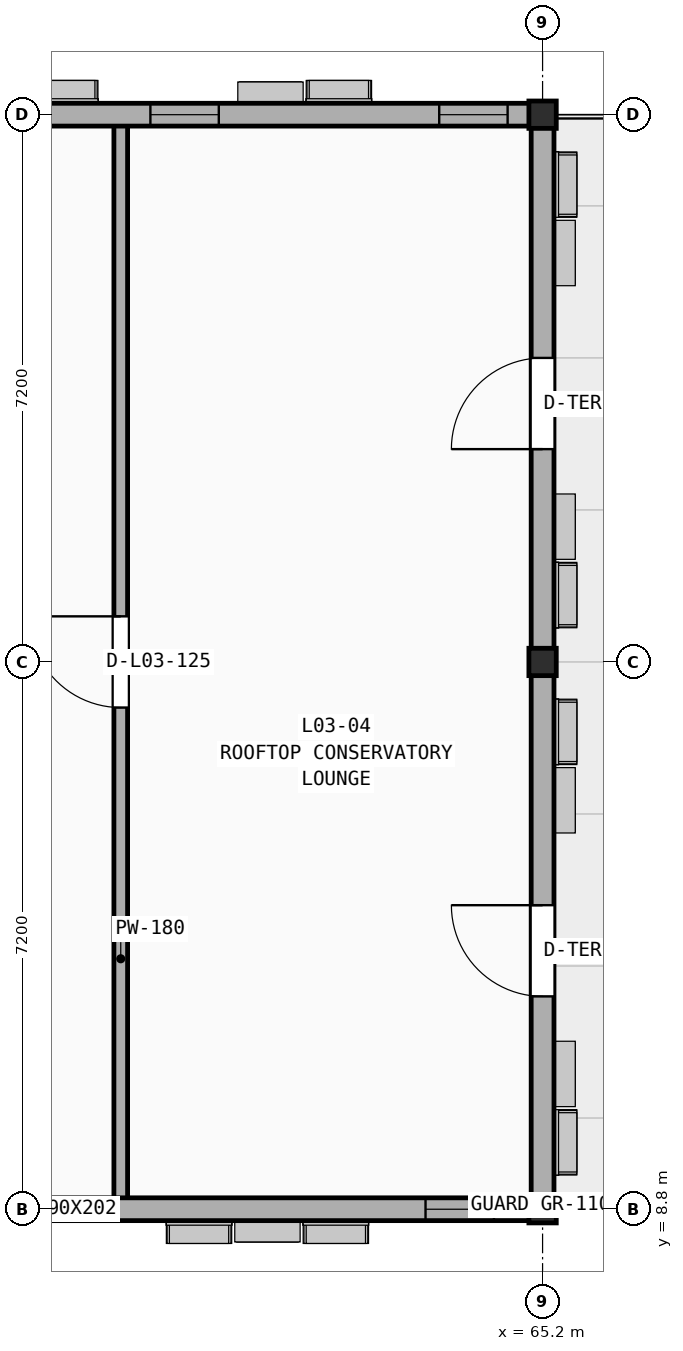
"""IFC4 building model, lengths in metres.
Left out: names, types, materials, properties, quantities, classifications, styles, units other than length and angle.
Written with IfcOpenShell. Run it as: python <this file> out.ifc"""

import sys

from ifc_helpers import new_model, si_unit, direction, frame, frame_2d, origin, origin_2d, place, context, subcontext, project, spatial, rectangle, extrude, element, fill, save


model = new_model("IFC4")
c1 = context("Model", 3, precision=1e-05, world=origin(), true_north=direction((0.0, 1.0)))
c2 = subcontext(c1, "Body", "Model", "MODEL_VIEW")
j1 = project(units=[si_unit("LENGTHUNIT", "METRE"), si_unit("PLANEANGLEUNIT", "RADIAN")], contexts=[c1])
p1 = place(None, origin())
s1 = spatial("IfcSite", under=j1, at=p1, CompositionType="ELEMENT")
p2 = place(p1, origin())
s2 = spatial("IfcBuilding", under=s1, at=p2, CompositionType="ELEMENT")
p3 = place(p2, frame((0.0, 0.0, 13.8)))
s3 = spatial("IfcBuildingStorey", under=s2, at=p3, CompositionType="ELEMENT", Elevation=13.8)
for number, where, z_axis, x_axis in (
    (1, (65.2, 8.8, 0.0), (0.0, 0.0, 1.0), (1.0, 0.0, 0.0)),
    (2, (65.2, 16.0, 0.0), (0.0, 0.0, 1.0), (1.0, 0.0, 0.0)),
    (3, (65.2, 23.2, 0.0), (0.0, 0.0, 1.0), (1.0, 0.0, 0.0)),
):
    element("IfcColumn", number, at=place(p3, frame(where, z_axis=z_axis, x_axis=x_axis)), inside=s3, PredefinedType="COLUMN", context=c2, shape_type="SweptSolid", body=[
        extrude(rectangle(XDim=0.36, YDim=0.36, at=origin_2d()), origin(), (0.0, 0.0, 1.0), 3.62),
    ])
p4 = place(p3, frame((59.65, 8.94, 0.0), z_axis=(0.0, 0.0, 1.0), x_axis=(0.0, 1.0, 0.0)))
e4 = element("IfcWall", 4, at=p4, inside=s3, PredefinedType="PARTITIONING", context=c2, shape_type="SweptSolid", body=[
    extrude(rectangle(XDim=14.12, YDim=0.18, at=frame_2d((7.06, 0.0))), origin(), (0.0, 0.0, 1.0), 3.01),
])
p5 = place(p4, frame((6.46, 0.0, -0.01)))
e5 = element("IfcOpeningElement", 5, at=p5, cuts=e4, PredefinedType="OPENING", context=c2, shape_type="SweptSolid", body=[
    extrude(rectangle(XDim=1.2, YDim=2.21, at=frame_2d((0.6, 1.105))), frame((0.0, 0.1, 0.0), z_axis=(0.0, -1.0, 0.0), x_axis=(1.0, 0.0, 0.0)), (0.0, 0.0, 1.0), 0.2),
])
p6 = place(p3, frame((58.0, 8.8, 0.0), z_axis=(0.0, 0.0, 1.0), x_axis=(1.0, 0.0, 0.0)))
e6 = element("IfcWall", 6, at=p6, inside=s3, PredefinedType="SOLIDWALL", context=c2, shape_type="SweptSolid", body=[
    extrude(rectangle(XDim=7.2, YDim=0.3, at=frame_2d((3.6, 0.0))), origin(), (0.0, 0.0, 1.0), 3.01),
])
p7 = place(p6, frame((0.46, 0.0, 0.85)))
e7 = element("IfcOpeningElement", 7, at=p7, cuts=e6, PredefinedType="OPENING", context=c2, shape_type="SweptSolid", body=[
    extrude(rectangle(XDim=0.9, YDim=2.02, at=frame_2d((0.45, 1.01))), frame((0.0, 0.16, 0.0), z_axis=(0.0, -1.0, 0.0), x_axis=(1.0, 0.0, 0.0)), (0.0, 0.0, 1.0), 0.32),
])
p8 = place(p6, frame((5.66, 0.0, 0.85)))
e8 = element("IfcOpeningElement", 8, at=p8, cuts=e6, PredefinedType="OPENING", context=c2, shape_type="SweptSolid", body=[
    extrude(rectangle(XDim=0.9, YDim=2.02, at=frame_2d((0.45, 1.01))), frame((0.0, 0.16, 0.0), z_axis=(0.0, -1.0, 0.0), x_axis=(1.0, 0.0, 0.0)), (0.0, 0.0, 1.0), 0.32),
])
p9 = place(p3, frame((65.2, 23.2, 0.0), z_axis=(0.0, 0.0, 1.0), x_axis=(-1.0, 0.0, 0.0)))
e9 = element("IfcWall", 9, at=p9, inside=s3, PredefinedType="SOLIDWALL", context=c2, shape_type="SweptSolid", body=[
    extrude(rectangle(XDim=7.2, YDim=0.3, at=frame_2d((3.6, 0.0))), origin(), (0.0, 0.0, 1.0), 3.01),
])
p10 = place(p9, frame((0.46, 0.0, 0.85)))
e10 = element("IfcOpeningElement", 10, at=p10, cuts=e9, PredefinedType="OPENING", context=c2, shape_type="SweptSolid", body=[
    extrude(rectangle(XDim=0.9, YDim=2.02, at=frame_2d((0.45, 1.01))), frame((0.0, 0.16, 0.0), z_axis=(0.0, -1.0, 0.0), x_axis=(1.0, 0.0, 0.0)), (0.0, 0.0, 1.0), 0.32),
])
p11 = place(p9, frame((4.26, 0.0, 0.85)))
e11 = element("IfcOpeningElement", 11, at=p11, cuts=e9, PredefinedType="OPENING", context=c2, shape_type="SweptSolid", body=[
    extrude(rectangle(XDim=0.9, YDim=2.02, at=frame_2d((0.45, 1.01))), frame((0.0, 0.16, 0.0), z_axis=(0.0, -1.0, 0.0), x_axis=(1.0, 0.0, 0.0)), (0.0, 0.0, 1.0), 0.32),
])
p12 = place(p3, frame((65.2, 8.8, 0.0), z_axis=(0.0, 0.0, 1.0), x_axis=(0.0, 1.0, 0.0)))
e12 = element("IfcWall", 12, at=p12, inside=s3, PredefinedType="SOLIDWALL", context=c2, shape_type="SweptSolid", body=[
    extrude(rectangle(XDim=7.2, YDim=0.3, at=frame_2d((3.6, 0.0))), origin(), (0.0, 0.0, 1.0), 3.01),
])
p13 = place(p12, frame((2.8, 0.0, -0.01)))
e13 = element("IfcOpeningElement", 13, at=p13, cuts=e12, PredefinedType="OPENING", context=c2, shape_type="SweptSolid", body=[
    extrude(rectangle(XDim=1.2, YDim=2.21, at=frame_2d((0.6, 1.105))), frame((0.0, 0.16, 0.0), z_axis=(0.0, -1.0, 0.0), x_axis=(1.0, 0.0, 0.0)), (0.0, 0.0, 1.0), 0.32),
])
p14 = place(p3, frame((65.2, 16.0, 0.0), z_axis=(0.0, 0.0, 1.0), x_axis=(0.0, 1.0, 0.0)))
e14 = element("IfcWall", 14, at=p14, inside=s3, PredefinedType="SOLIDWALL", context=c2, shape_type="SweptSolid", body=[
    extrude(rectangle(XDim=7.2, YDim=0.3, at=frame_2d((3.6, 0.0))), origin(), (0.0, 0.0, 1.0), 3.01),
])
p15 = place(p14, frame((2.8, 0.0, -0.01)))
e15 = element("IfcOpeningElement", 15, at=p15, cuts=e14, PredefinedType="OPENING", context=c2, shape_type="SweptSolid", body=[
    extrude(rectangle(XDim=1.2, YDim=2.21, at=frame_2d((0.6, 1.105))), frame((0.0, 0.16, 0.0), z_axis=(0.0, -1.0, 0.0), x_axis=(1.0, 0.0, 0.0)), (0.0, 0.0, 1.0), 0.32),
])
p16 = place(p5, frame((0.0, 0.0, 0.01)))
e16 = element("IfcDoor", 16, at=p16, inside=s3, OperationType="SINGLE_SWING_RIGHT", PredefinedType="DOOR", context=c2, shape_type="SweptSolid", body=[
    extrude(rectangle(XDim=1.2, YDim=2.2, at=frame_2d((0.6, 1.1))), frame((0.0, 0.025, 0.0), z_axis=(0.0, -1.0, 0.0), x_axis=(1.0, 0.0, 0.0)), (0.0, 0.0, 1.0), 0.05),
])
fill(e5, e16)
p17 = place(p7, origin())
e17 = element("IfcWindow", 17, at=p17, inside=s3, PartitioningType="SINGLE_PANEL", PredefinedType="WINDOW", context=c2, shape_type="SweptSolid", body=[
    extrude(rectangle(XDim=0.9, YDim=2.02, at=frame_2d((0.45, 1.01))), frame((0.0, 0.03, 0.0), z_axis=(0.0, -1.0, 0.0), x_axis=(1.0, 0.0, 0.0)), (0.0, 0.0, 1.0), 0.06),
])
fill(e7, e17)
p18 = place(p8, origin())
e18 = element("IfcWindow", 18, at=p18, inside=s3, PartitioningType="SINGLE_PANEL", PredefinedType="WINDOW", context=c2, shape_type="SweptSolid", body=[
    extrude(rectangle(XDim=0.9, YDim=2.02, at=frame_2d((0.45, 1.01))), frame((0.0, 0.03, 0.0), z_axis=(0.0, -1.0, 0.0), x_axis=(1.0, 0.0, 0.0)), (0.0, 0.0, 1.0), 0.06),
])
fill(e8, e18)
p19 = place(p10, origin())
e19 = element("IfcWindow", 19, at=p19, inside=s3, PartitioningType="SINGLE_PANEL", PredefinedType="WINDOW", context=c2, shape_type="SweptSolid", body=[
    extrude(rectangle(XDim=0.9, YDim=2.02, at=frame_2d((0.45, 1.01))), frame((0.0, 0.03, 0.0), z_axis=(0.0, -1.0, 0.0), x_axis=(1.0, 0.0, 0.0)), (0.0, 0.0, 1.0), 0.06),
])
fill(e10, e19)
p20 = place(p11, origin())
e20 = element("IfcWindow", 20, at=p20, inside=s3, PartitioningType="SINGLE_PANEL", PredefinedType="WINDOW", context=c2, shape_type="SweptSolid", body=[
    extrude(rectangle(XDim=0.9, YDim=2.02, at=frame_2d((0.45, 1.01))), frame((0.0, 0.03, 0.0), z_axis=(0.0, -1.0, 0.0), x_axis=(1.0, 0.0, 0.0)), (0.0, 0.0, 1.0), 0.06),
])
fill(e11, e20)
p21 = place(p13, frame((0.0, 0.0, 0.01)))
e21 = element("IfcDoor", 21, at=p21, inside=s3, OperationType="SINGLE_SWING_RIGHT", PredefinedType="DOOR", context=c2, shape_type="SweptSolid", body=[
    extrude(rectangle(XDim=1.2, YDim=2.2, at=frame_2d((0.6, 1.1))), frame((0.0, 0.025, 0.0), z_axis=(0.0, -1.0, 0.0), x_axis=(1.0, 0.0, 0.0)), (0.0, 0.0, 1.0), 0.05),
])
fill(e13, e21)
p22 = place(p15, frame((0.0, 0.0, 0.01)))
e22 = element("IfcDoor", 22, at=p22, inside=s3, OperationType="SINGLE_SWING_LEFT", PredefinedType="DOOR", context=c2, shape_type="SweptSolid", body=[
    extrude(rectangle(XDim=1.2, YDim=2.2, at=frame_2d((0.6, 1.1))), frame((0.0, 0.025, 0.0), z_axis=(0.0, -1.0, 0.0), x_axis=(1.0, 0.0, 0.0)), (0.0, 0.0, 1.0), 0.05),
])
fill(e15, e22)
save(model, sys.argv[1])
